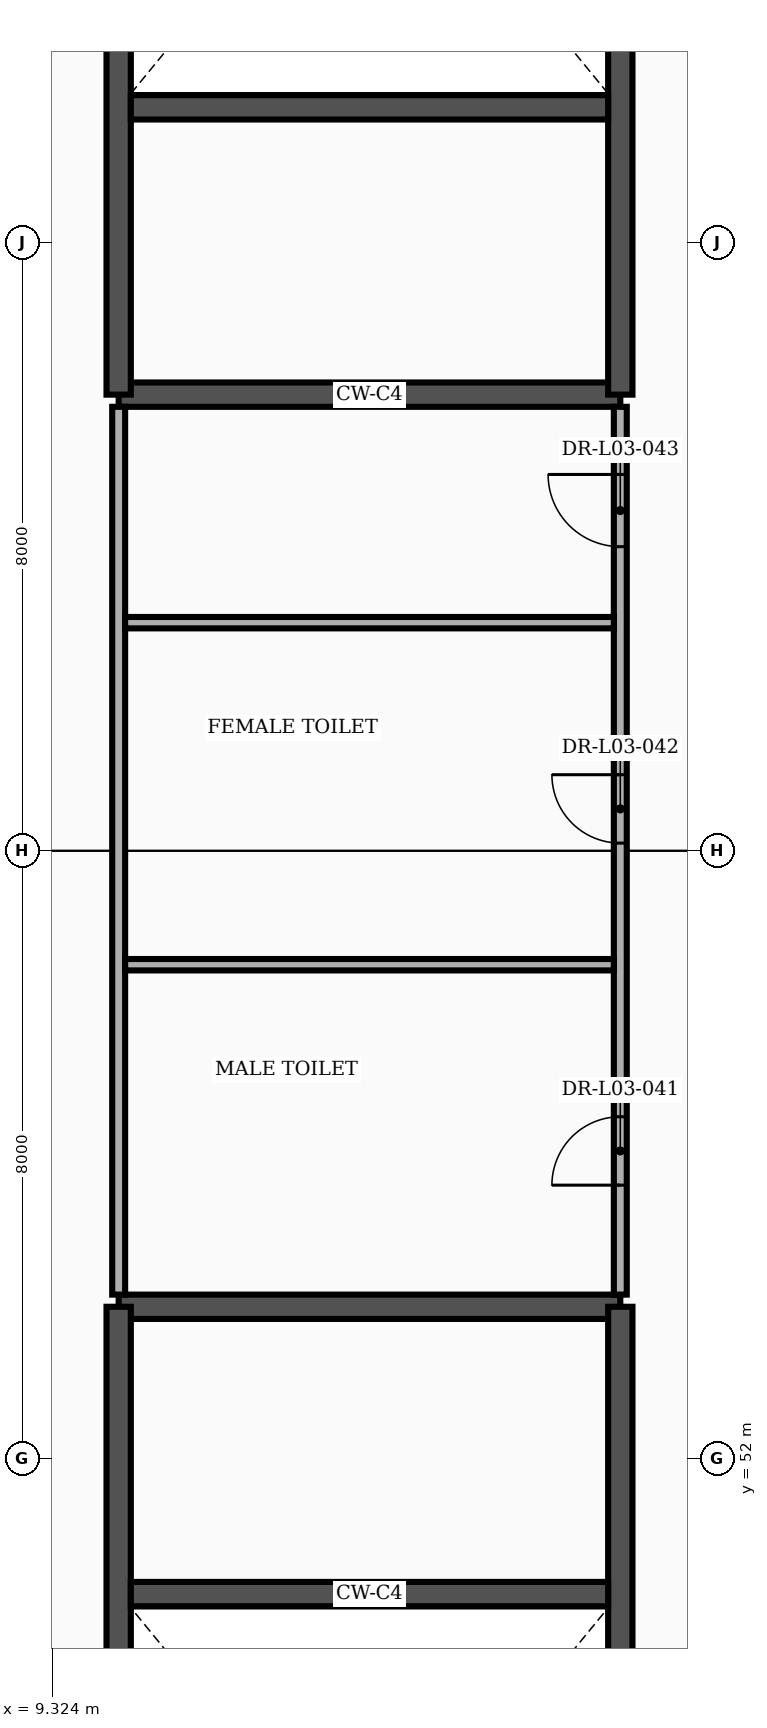
"""IFC4 building model, lengths in metres.
Left out: names, types, materials, properties, quantities, classifications, styles, units other than length and angle.
Written with IfcOpenShell. Run it as: python <this file> out.ifc"""

import sys

from ifc_helpers import new_model, si_unit, direction, frame, frame_2d, origin, place, context, subcontext, project, spatial, rectangle, extrude, element, fill, save


model = new_model("IFC4")
c1 = context("Model", 3, precision=1e-05, world=origin(), true_north=direction((0.0, 1.0)))
c2 = subcontext(c1, "Body", "Model", "MODEL_VIEW")
j1 = project(units=[si_unit("LENGTHUNIT", "METRE"), si_unit("PLANEANGLEUNIT", "RADIAN")], contexts=[c1])
p1 = place(None, origin())
s1 = spatial("IfcSite", under=j1, at=p1, CompositionType="ELEMENT")
p2 = place(p1, origin())
s2 = spatial("IfcBuilding", under=s1, at=p2, CompositionType="ELEMENT")
p3 = place(p2, frame((0.0, 0.0, 16.8)))
s3 = spatial("IfcBuildingStorey", under=s2, at=p3, CompositionType="ELEMENT", Elevation=16.8)
p4 = place(p3, frame((10.2, 54.0, 0.0), z_axis=(0.0, 0.0, 1.0), x_axis=(1.0, 0.0, 0.0)))
e1 = element("IfcWall", 1, at=p4, inside=s3, PredefinedType="SHEAR", context=c2, shape_type="SweptSolid", body=[
    extrude(rectangle(XDim=6.6, YDim=0.32, at=frame_2d((3.3, 0.0))), origin(), (0.0, 0.0, 1.0), 4.555),
])
p5 = place(p3, frame((10.2, 39.4, 0.0), z_axis=(0.0, 0.0, 1.0), x_axis=(0.0, 1.0, 0.0)))
e2 = element("IfcWall", 2, at=p5, inside=s3, PredefinedType="SHEAR", context=c2, shape_type="SweptSolid", body=[
    extrude(rectangle(XDim=14.6, YDim=0.32, at=frame_2d((7.3, 0.0))), origin(), (0.0, 0.0, 1.0), 4.555),
])
p6 = place(p3, frame((16.8, 39.4, 0.0), z_axis=(0.0, 0.0, 1.0), x_axis=(0.0, 1.0, 0.0)))
e3 = element("IfcWall", 3, at=p6, inside=s3, PredefinedType="SHEAR", context=c2, shape_type="SweptSolid", body=[
    extrude(rectangle(XDim=14.6, YDim=0.32, at=frame_2d((7.3, 0.0))), origin(), (0.0, 0.0, 1.0), 4.555),
])
p7 = place(p6, frame((0.55, 0.0, 0.0)))
e4 = element("IfcOpeningElement", 4, at=p7, cuts=e3, PredefinedType="OPENING", context=c2, shape_type="SweptSolid", body=[
    extrude(rectangle(XDim=2.4, YDim=2.25, at=frame_2d((1.2, 1.125))), frame((0.0, 0.172, 0.0), z_axis=(0.0, -1.0, 0.0), x_axis=(1.0, 0.0, 0.0)), (0.0, 0.0, 1.0), 0.344),
])
p8 = place(p3, frame((10.36, 50.22, 0.0), z_axis=(0.0, 0.0, 1.0), x_axis=(1.0, 0.0, 0.0)))
e5 = element("IfcWall", 5, at=p8, inside=s3, PredefinedType="SHEAR", context=c2, shape_type="SweptSolid", body=[
    extrude(rectangle(XDim=6.28, YDim=0.32, at=frame_2d((3.14, 0.0))), origin(), (0.0, 0.0, 1.0), 4.555),
])
p9 = place(p3, frame((10.2, 66.0, 0.0), z_axis=(0.0, 0.0, 1.0), x_axis=(1.0, 0.0, 0.0)))
e6 = element("IfcWall", 6, at=p9, inside=s3, PredefinedType="SHEAR", context=c2, shape_type="SweptSolid", body=[
    extrude(rectangle(XDim=6.6, YDim=0.32, at=frame_2d((3.3, 0.0))), origin(), (0.0, 0.0, 1.0), 4.555),
])
p10 = place(p3, frame((10.2, 66.0, 0.0), z_axis=(0.0, 0.0, 1.0), x_axis=(0.0, 1.0, 0.0)))
e7 = element("IfcWall", 7, at=p10, inside=s3, PredefinedType="SHEAR", context=c2, shape_type="SweptSolid", body=[
    extrude(rectangle(XDim=14.6, YDim=0.32, at=frame_2d((7.3, 0.0))), origin(), (0.0, 0.0, 1.0), 4.555),
])
p11 = place(p3, frame((16.8, 66.0, 0.0), z_axis=(0.0, 0.0, 1.0), x_axis=(0.0, 1.0, 0.0)))
e8 = element("IfcWall", 8, at=p11, inside=s3, PredefinedType="SHEAR", context=c2, shape_type="SweptSolid", body=[
    extrude(rectangle(XDim=14.6, YDim=0.32, at=frame_2d((7.3, 0.0))), origin(), (0.0, 0.0, 1.0), 4.555),
])
p12 = place(p11, frame((11.65, 0.0, 0.0)))
e9 = element("IfcOpeningElement", 9, at=p12, cuts=e8, PredefinedType="OPENING", context=c2, shape_type="SweptSolid", body=[
    extrude(rectangle(XDim=2.4, YDim=2.25, at=frame_2d((1.2, 1.125))), frame((0.0, 0.172, 0.0), z_axis=(0.0, -1.0, 0.0), x_axis=(1.0, 0.0, 0.0)), (0.0, 0.0, 1.0), 0.344),
])
p13 = place(p3, frame((10.36, 69.78, 0.0), z_axis=(0.0, 0.0, 1.0), x_axis=(1.0, 0.0, 0.0)))
e10 = element("IfcWall", 10, at=p13, inside=s3, PredefinedType="SHEAR", context=c2, shape_type="SweptSolid", body=[
    extrude(rectangle(XDim=6.28, YDim=0.32, at=frame_2d((3.14, 0.0))), origin(), (0.0, 0.0, 1.0), 4.555),
])
p14 = place(p3, frame((10.2, 54.16, 0.0), z_axis=(0.0, 0.0, 1.0), x_axis=(0.0, 1.0, 0.0)))
e11 = element("IfcWall", 11, at=p14, inside=s3, PredefinedType="PARTITIONING", context=c2, shape_type="SweptSolid", body=[
    extrude(rectangle(XDim=11.68, YDim=0.17, at=frame_2d((5.84, 0.0))), origin(), (0.0, 0.0, 1.0), 4.555),
])
p15 = place(p3, frame((16.8, 54.16, 0.0), z_axis=(0.0, 0.0, 1.0), x_axis=(0.0, 1.0, 0.0)))
e12 = element("IfcWall", 12, at=p15, inside=s3, PredefinedType="PARTITIONING", context=c2, shape_type="SweptSolid", body=[
    extrude(rectangle(XDim=11.68, YDim=0.17, at=frame_2d((5.84, 0.0))), origin(), (0.0, 0.0, 1.0), 4.555),
])
p16 = place(p15, frame((1.44, 0.0, 0.0)))
e13 = element("IfcOpeningElement", 13, at=p16, cuts=e12, PredefinedType="OPENING", context=c2, shape_type="SweptSolid", body=[
    extrude(rectangle(XDim=0.9, YDim=2.1, at=frame_2d((0.45, 1.05))), frame((0.0, 0.097, 0.0), z_axis=(0.0, -1.0, 0.0), x_axis=(1.0, 0.0, 0.0)), (0.0, 0.0, 1.0), 0.194),
])
p17 = place(p15, frame((5.94, 0.0, 0.0)))
e14 = element("IfcOpeningElement", 14, at=p17, cuts=e12, PredefinedType="OPENING", context=c2, shape_type="SweptSolid", body=[
    extrude(rectangle(XDim=0.9, YDim=2.1, at=frame_2d((0.45, 1.05))), frame((0.0, 0.097, 0.0), z_axis=(0.0, -1.0, 0.0), x_axis=(1.0, 0.0, 0.0)), (0.0, 0.0, 1.0), 0.194),
])
p18 = place(p15, frame((9.84, 0.0, 0.0)))
e15 = element("IfcOpeningElement", 15, at=p18, cuts=e12, PredefinedType="OPENING", context=c2, shape_type="SweptSolid", body=[
    extrude(rectangle(XDim=0.95, YDim=2.1, at=frame_2d((0.475, 1.05))), frame((0.0, 0.097, 0.0), z_axis=(0.0, -1.0, 0.0), x_axis=(1.0, 0.0, 0.0)), (0.0, 0.0, 1.0), 0.194),
])
for number, where, z_axis, x_axis in (
    (16, (10.285, 58.5, 0.0), (0.0, 0.0, 1.0), (1.0, 0.0, 0.0)),
    (17, (10.285, 63.0, 0.0), (0.0, 0.0, 1.0), (1.0, 0.0, 0.0)),
):
    element("IfcWall", number, at=place(p3, frame(where, z_axis=z_axis, x_axis=x_axis)), inside=s3, PredefinedType="PARTITIONING", context=c2, shape_type="SweptSolid", body=[
        extrude(rectangle(XDim=6.43, YDim=0.15, at=frame_2d((3.215, 0.0))), origin(), (0.0, 0.0, 1.0), 4.555),
    ])
p19 = place(p16, origin())
e18 = element("IfcDoor", 18, at=p19, inside=s3, OperationType="SINGLE_SWING_LEFT", PredefinedType="DOOR", context=c2, shape_type="SweptSolid", body=[
    extrude(rectangle(XDim=0.9, YDim=2.1, at=frame_2d((0.45, 1.05))), frame((0.0, 0.025, 0.0), z_axis=(0.0, -1.0, 0.0), x_axis=(1.0, 0.0, 0.0)), (0.0, 0.0, 1.0), 0.05),
])
fill(e13, e18)
p20 = place(p17, origin())
e19 = element("IfcDoor", 19, at=p20, inside=s3, OperationType="SINGLE_SWING_RIGHT", PredefinedType="DOOR", context=c2, shape_type="SweptSolid", body=[
    extrude(rectangle(XDim=0.9, YDim=2.1, at=frame_2d((0.45, 1.05))), frame((0.0, 0.025, 0.0), z_axis=(0.0, -1.0, 0.0), x_axis=(1.0, 0.0, 0.0)), (0.0, 0.0, 1.0), 0.05),
])
fill(e14, e19)
p21 = place(p18, origin())
e20 = element("IfcDoor", 20, at=p21, inside=s3, OperationType="SINGLE_SWING_RIGHT", PredefinedType="DOOR", context=c2, shape_type="SweptSolid", body=[
    extrude(rectangle(XDim=0.95, YDim=2.1, at=frame_2d((0.475, 1.05))), frame((0.0, 0.025, 0.0), z_axis=(0.0, -1.0, 0.0), x_axis=(1.0, 0.0, 0.0)), (0.0, 0.0, 1.0), 0.05),
])
fill(e15, e20)
save(model, sys.argv[1])
